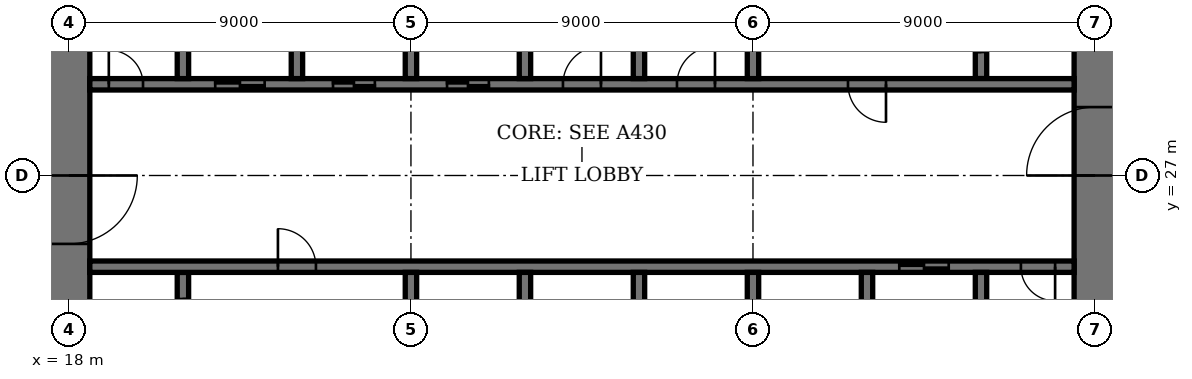
"""IFC4 building model, lengths in metres.
Left out: names, types, materials, properties, quantities, classifications, styles, units other than length and angle.
Written with IfcOpenShell. Run it as: python <this file> out.ifc"""

import sys

from ifc_helpers import new_model, si_unit, direction, frame, frame_2d, origin, place, context, subcontext, project, spatial, rectangle, extrude, element, fill, save


model = new_model("IFC4")
c1 = context("Model", 3, precision=1e-05, world=origin(), true_north=direction((0.0, 1.0)))
c2 = subcontext(c1, "Body", "Model", "MODEL_VIEW")
j1 = project(units=[si_unit("LENGTHUNIT", "METRE"), si_unit("PLANEANGLEUNIT", "RADIAN")], contexts=[c1])
p1 = place(None, origin())
s1 = spatial("IfcSite", under=j1, at=p1, CompositionType="ELEMENT")
p2 = place(p1, origin())
s2 = spatial("IfcBuilding", under=s1, at=p2, CompositionType="ELEMENT")
p3 = place(p2, frame((0.0, 0.0, 174.2)))
s3 = spatial("IfcBuildingStorey", under=s2, at=p3, CompositionType="ELEMENT", Elevation=174.2)
p4 = place(p3, frame((18.0, 35.45, 0.0), z_axis=(0.0, 0.0, 1.0), x_axis=(0.0, -1.0, 0.0)))
e1 = element("IfcWall", 1, at=p4, inside=s3, PredefinedType="SHEAR", context=c2, shape_type="SweptSolid", body=[
    extrude(rectangle(XDim=16.9, YDim=1.1, at=frame_2d((8.45, 0.0))), origin(), (0.0, 0.0, 1.0), 4.0),
])
p5 = place(p4, frame((8.45, 0.0, 0.0)))
e2 = element("IfcOpeningElement", 2, at=p5, cuts=e1, PredefinedType="OPENING", context=c2, shape_type="SweptSolid", body=[
    extrude(rectangle(XDim=1.8, YDim=2.4, at=frame_2d((0.9, 1.2))), frame((0.0, 0.56, 0.0), z_axis=(0.0, -1.0, 0.0), x_axis=(1.0, 0.0, 0.0)), (0.0, 0.0, 1.0), 1.12),
])
p6 = place(p3, frame((45.0, 18.55, 0.0), z_axis=(0.0, 0.0, 1.0), x_axis=(0.0, 1.0, 0.0)))
e3 = element("IfcWall", 3, at=p6, inside=s3, PredefinedType="SHEAR", context=c2, shape_type="SweptSolid", body=[
    extrude(rectangle(XDim=16.9, YDim=1.1, at=frame_2d((8.45, 0.0))), origin(), (0.0, 0.0, 1.0), 4.0),
])
p7 = place(p6, frame((8.45, 0.0, 0.0)))
e4 = element("IfcOpeningElement", 4, at=p7, cuts=e3, PredefinedType="OPENING", context=c2, shape_type="SweptSolid", body=[
    extrude(rectangle(XDim=1.8, YDim=2.4, at=frame_2d((0.9, 1.2))), frame((0.0, 0.56, 0.0), z_axis=(0.0, -1.0, 0.0), x_axis=(1.0, 0.0, 0.0)), (0.0, 0.0, 1.0), 1.12),
])
p8 = place(p3, frame((21.0, 21.95, 0.0), z_axis=(0.0, 0.0, 1.0), x_axis=(0.0, 1.0, 0.0)))
e5 = element("IfcWall", 5, at=p8, inside=s3, PredefinedType="SHEAR", context=c2, shape_type="SweptSolid", body=[
    extrude(rectangle(XDim=2.5, YDim=0.3, at=frame_2d((1.25, 0.0))), origin(), (0.0, 0.0, 1.0), 4.0),
])
p9 = place(p8, frame((0.7, 0.0, 0.0)))
e6 = element("IfcOpeningElement", 6, at=p9, cuts=e5, PredefinedType="OPENING", context=c2, shape_type="SweptSolid", body=[
    extrude(rectangle(XDim=1.1, YDim=2.4, at=frame_2d((0.55, 1.2))), frame((0.0, 0.16, 0.0), z_axis=(0.0, -1.0, 0.0), x_axis=(1.0, 0.0, 0.0)), (0.0, 0.0, 1.0), 0.32),
])
p10 = place(p3, frame((42.0, 29.55, 0.0), z_axis=(0.0, 0.0, 1.0), x_axis=(0.0, 1.0, 0.0)))
e7 = element("IfcWall", 7, at=p10, inside=s3, PredefinedType="SHEAR", context=c2, shape_type="SweptSolid", body=[
    extrude(rectangle(XDim=2.5, YDim=0.3, at=frame_2d((1.25, 0.0))), origin(), (0.0, 0.0, 1.0), 4.0),
])
p11 = place(p10, frame((0.7, 0.0, 0.0)))
e8 = element("IfcOpeningElement", 8, at=p11, cuts=e7, PredefinedType="OPENING", context=c2, shape_type="SweptSolid", body=[
    extrude(rectangle(XDim=1.1, YDim=2.4, at=frame_2d((0.55, 1.2))), frame((0.0, 0.16, 0.0), z_axis=(0.0, -1.0, 0.0), x_axis=(1.0, 0.0, 0.0)), (0.0, 0.0, 1.0), 0.32),
])
p12 = place(p3, frame((18.55, 24.6, 0.0), z_axis=(0.0, 0.0, 1.0), x_axis=(1.0, 0.0, 0.0)))
e9 = element("IfcWall", 9, at=p12, inside=s3, PredefinedType="SHEAR", context=c2, shape_type="SweptSolid", body=[
    extrude(rectangle(XDim=25.9, YDim=0.3, at=frame_2d((12.95, 0.0))), origin(), (0.0, 0.0, 1.0), 4.0),
])
p13 = place(p12, frame((4.95, 0.0, 0.0)))
e10 = element("IfcOpeningElement", 10, at=p13, cuts=e9, PredefinedType="OPENING", context=c2, shape_type="SweptSolid", body=[
    extrude(rectangle(XDim=1.0, YDim=2.4, at=frame_2d((0.5, 1.2))), frame((0.0, 0.16, 0.0), z_axis=(0.0, -1.0, 0.0), x_axis=(1.0, 0.0, 0.0)), (0.0, 0.0, 1.0), 0.32),
])
p14 = place(p12, frame((24.5, 0.0, 0.0)))
e11 = element("IfcOpeningElement", 11, at=p14, cuts=e9, PredefinedType="OPENING", context=c2, shape_type="SweptSolid", body=[
    extrude(rectangle(XDim=0.9, YDim=2.1, at=frame_2d((0.45, 1.05))), frame((0.0, 0.16, 0.0), z_axis=(0.0, -1.0, 0.0), x_axis=(1.0, 0.0, 0.0)), (0.0, 0.0, 1.0), 0.32),
])
p15 = place(p12, frame((21.3, 0.0, 0.0)))
e12 = element("IfcOpeningElement", 12, at=p15, cuts=e9, PredefinedType="OPENING", context=c2, shape_type="SweptSolid", body=[
    extrude(rectangle(XDim=1.3, YDim=2.4, at=frame_2d((0.65, 1.2))), frame((0.0, 0.16, 0.0), z_axis=(0.0, -1.0, 0.0), x_axis=(1.0, 0.0, 0.0)), (0.0, 0.0, 1.0), 0.32),
])
p16 = place(p3, frame((18.55, 29.4, 0.0), z_axis=(0.0, 0.0, 1.0), x_axis=(1.0, 0.0, 0.0)))
e13 = element("IfcWall", 13, at=p16, inside=s3, PredefinedType="SHEAR", context=c2, shape_type="SweptSolid", body=[
    extrude(rectangle(XDim=25.9, YDim=0.3, at=frame_2d((12.95, 0.0))), origin(), (0.0, 0.0, 1.0), 4.0),
])
p17 = place(p16, frame((19.95, 0.0, 0.0)))
e14 = element("IfcOpeningElement", 14, at=p17, cuts=e13, PredefinedType="OPENING", context=c2, shape_type="SweptSolid", body=[
    extrude(rectangle(XDim=1.0, YDim=2.4, at=frame_2d((0.5, 1.2))), frame((0.0, 0.16, 0.0), z_axis=(0.0, -1.0, 0.0), x_axis=(1.0, 0.0, 0.0)), (0.0, 0.0, 1.0), 0.32),
])
p18 = place(p16, frame((0.5, 0.0, 0.0)))
e15 = element("IfcOpeningElement", 15, at=p18, cuts=e13, PredefinedType="OPENING", context=c2, shape_type="SweptSolid", body=[
    extrude(rectangle(XDim=0.9, YDim=2.1, at=frame_2d((0.45, 1.05))), frame((0.0, 0.16, 0.0), z_axis=(0.0, -1.0, 0.0), x_axis=(1.0, 0.0, 0.0)), (0.0, 0.0, 1.0), 0.32),
])
p19 = place(p16, frame((15.45, 0.0, 0.0)))
e16 = element("IfcOpeningElement", 16, at=p19, cuts=e13, PredefinedType="OPENING", context=c2, shape_type="SweptSolid", body=[
    extrude(rectangle(XDim=1.0, YDim=2.4, at=frame_2d((0.5, 1.2))), frame((0.0, 0.16, 0.0), z_axis=(0.0, -1.0, 0.0), x_axis=(1.0, 0.0, 0.0)), (0.0, 0.0, 1.0), 0.32),
])
p20 = place(p16, frame((12.45, 0.0, 0.0)))
e17 = element("IfcOpeningElement", 17, at=p20, cuts=e13, PredefinedType="OPENING", context=c2, shape_type="SweptSolid", body=[
    extrude(rectangle(XDim=1.0, YDim=2.4, at=frame_2d((0.5, 1.2))), frame((0.0, 0.16, 0.0), z_axis=(0.0, -1.0, 0.0), x_axis=(1.0, 0.0, 0.0)), (0.0, 0.0, 1.0), 0.32),
])
p21 = place(p16, frame((9.4, 0.0, 0.0)))
e18 = element("IfcOpeningElement", 18, at=p21, cuts=e13, PredefinedType="OPENING", context=c2, shape_type="SweptSolid", body=[
    extrude(rectangle(XDim=1.1, YDim=2.4, at=frame_2d((0.55, 1.2))), frame((0.0, 0.16, 0.0), z_axis=(0.0, -1.0, 0.0), x_axis=(1.0, 0.0, 0.0)), (0.0, 0.0, 1.0), 0.32),
])
p22 = place(p16, frame((6.4, 0.0, 0.0)))
e19 = element("IfcOpeningElement", 19, at=p22, cuts=e13, PredefinedType="OPENING", context=c2, shape_type="SweptSolid", body=[
    extrude(rectangle(XDim=1.1, YDim=2.4, at=frame_2d((0.55, 1.2))), frame((0.0, 0.16, 0.0), z_axis=(0.0, -1.0, 0.0), x_axis=(1.0, 0.0, 0.0)), (0.0, 0.0, 1.0), 0.32),
])
p23 = place(p16, frame((3.3, 0.0, 0.0)))
e20 = element("IfcOpeningElement", 20, at=p23, cuts=e13, PredefinedType="OPENING", context=c2, shape_type="SweptSolid", body=[
    extrude(rectangle(XDim=1.3, YDim=2.4, at=frame_2d((0.65, 1.2))), frame((0.0, 0.16, 0.0), z_axis=(0.0, -1.0, 0.0), x_axis=(1.0, 0.0, 0.0)), (0.0, 0.0, 1.0), 0.32),
])
for number, where, z_axis, x_axis in (
    (21, (30.0, 21.75, 0.0), (0.0, 0.0, 1.0), (0.0, 1.0, 0.0)),
    (22, (33.0, 29.55, 0.0), (0.0, 0.0, 1.0), (0.0, 1.0, 0.0)),
    (23, (33.0, 21.75, 0.0), (0.0, 0.0, 1.0), (0.0, 1.0, 0.0)),
    (24, (30.0, 29.55, 0.0), (0.0, 0.0, 1.0), (0.0, 1.0, 0.0)),
    (25, (36.0, 21.75, 0.0), (0.0, 0.0, 1.0), (0.0, 1.0, 0.0)),
    (26, (27.0, 29.55, 0.0), (0.0, 0.0, 1.0), (0.0, 1.0, 0.0)),
):
    element("IfcWall", number, at=place(p3, frame(where, z_axis=z_axis, x_axis=x_axis)), inside=s3, PredefinedType="SHEAR", context=c2, shape_type="SweptSolid", body=[
        extrude(rectangle(XDim=2.7, YDim=0.3, at=frame_2d((1.35, 0.0))), origin(), (0.0, 0.0, 1.0), 4.0),
    ])
for number, where, z_axis, x_axis in (
    (27, (39.0, 18.55, 0.0), (0.0, 0.0, 1.0), (0.0, 1.0, 0.0)),
    (28, (24.0, 29.55, 0.0), (0.0, 0.0, 1.0), (0.0, 1.0, 0.0)),
):
    element("IfcWall", number, at=place(p3, frame(where, z_axis=z_axis, x_axis=x_axis)), inside=s3, PredefinedType="SHEAR", context=c2, shape_type="SweptSolid", body=[
        extrude(rectangle(XDim=5.9, YDim=0.3, at=frame_2d((2.95, 0.0))), origin(), (0.0, 0.0, 1.0), 4.0),
    ])
for number, where, z_axis, x_axis in (
    (29, (42.0, 21.75, 0.0), (0.0, 0.0, 1.0), (0.0, 1.0, 0.0)),
    (30, (21.0, 29.55, 0.0), (0.0, 0.0, 1.0), (0.0, 1.0, 0.0)),
):
    element("IfcWall", number, at=place(p3, frame(where, z_axis=z_axis, x_axis=x_axis)), inside=s3, PredefinedType="SHEAR", context=c2, shape_type="SweptSolid", body=[
        extrude(rectangle(XDim=2.7, YDim=0.3, at=frame_2d((1.35, 0.0))), origin(), (0.0, 0.0, 1.0), 4.0),
    ])
for number, where, z_axis, x_axis in (
    (31, (27.0, 21.6, 0.0), (0.0, 0.0, 1.0), (0.0, 1.0, 0.0)),
    (32, (36.0, 29.55, 0.0), (0.0, 0.0, 1.0), (0.0, 1.0, 0.0)),
):
    element("IfcWall", number, at=place(p3, frame(where, z_axis=z_axis, x_axis=x_axis)), inside=s3, PredefinedType="SHEAR", context=c2, shape_type="SweptSolid", body=[
        extrude(rectangle(XDim=2.85, YDim=0.3, at=frame_2d((1.425, 0.0))), origin(), (0.0, 0.0, 1.0), 4.0),
    ])
p24 = place(p5, origin())
e33 = element("IfcDoor", 33, at=p24, inside=s3, OperationType="DOUBLE_DOOR_DOUBLE_SWING", PredefinedType="DOOR", context=c2, shape_type="SweptSolid", body=[
    extrude(rectangle(XDim=1.8, YDim=2.4, at=frame_2d((0.9, 1.2))), frame((0.0, 0.03, 0.0), z_axis=(0.0, -1.0, 0.0), x_axis=(1.0, 0.0, 0.0)), (0.0, 0.0, 1.0), 0.06),
    extrude(rectangle(XDim=0.04, YDim=2.4, at=frame_2d((0.02, 1.2))), frame((0.0, 0.55, 0.0), z_axis=(0.0, -1.0, 0.0), x_axis=(1.0, 0.0, 0.0)), (0.0, 0.0, 1.0), 1.1),
    extrude(rectangle(XDim=0.04, YDim=2.4, at=frame_2d((1.78, 1.2))), frame((0.0, 0.55, 0.0), z_axis=(0.0, -1.0, 0.0), x_axis=(1.0, 0.0, 0.0)), (0.0, 0.0, 1.0), 1.1),
    extrude(rectangle(XDim=1.8, YDim=0.04, at=frame_2d((0.9, 2.38))), frame((0.0, 0.55, 0.0), z_axis=(0.0, -1.0, 0.0), x_axis=(1.0, 0.0, 0.0)), (0.0, 0.0, 1.0), 1.1),
])
fill(e2, e33)
p25 = place(p7, origin())
e34 = element("IfcDoor", 34, at=p25, inside=s3, OperationType="DOUBLE_DOOR_DOUBLE_SWING", PredefinedType="DOOR", context=c2, shape_type="SweptSolid", body=[
    extrude(rectangle(XDim=1.8, YDim=2.4, at=frame_2d((0.9, 1.2))), frame((0.0, 0.03, 0.0), z_axis=(0.0, -1.0, 0.0), x_axis=(1.0, 0.0, 0.0)), (0.0, 0.0, 1.0), 0.06),
    extrude(rectangle(XDim=0.04, YDim=2.4, at=frame_2d((0.02, 1.2))), frame((0.0, 0.55, 0.0), z_axis=(0.0, -1.0, 0.0), x_axis=(1.0, 0.0, 0.0)), (0.0, 0.0, 1.0), 1.1),
    extrude(rectangle(XDim=0.04, YDim=2.4, at=frame_2d((1.78, 1.2))), frame((0.0, 0.55, 0.0), z_axis=(0.0, -1.0, 0.0), x_axis=(1.0, 0.0, 0.0)), (0.0, 0.0, 1.0), 1.1),
    extrude(rectangle(XDim=1.8, YDim=0.04, at=frame_2d((0.9, 2.38))), frame((0.0, 0.55, 0.0), z_axis=(0.0, -1.0, 0.0), x_axis=(1.0, 0.0, 0.0)), (0.0, 0.0, 1.0), 1.1),
])
fill(e4, e34)
p26 = place(p13, origin())
e35 = element("IfcDoor", 35, at=p26, inside=s3, OperationType="SINGLE_SWING_RIGHT", PredefinedType="DOOR", context=c2, shape_type="SweptSolid", body=[
    extrude(rectangle(XDim=1.0, YDim=2.4, at=frame_2d((0.5, 1.2))), frame((0.0, 0.03, 0.0), z_axis=(0.0, -1.0, 0.0), x_axis=(1.0, 0.0, 0.0)), (0.0, 0.0, 1.0), 0.06),
])
fill(e10, e35)
p27 = place(p17, origin())
e36 = element("IfcDoor", 36, at=p27, inside=s3, OperationType="SINGLE_SWING_RIGHT", PredefinedType="DOOR", context=c2, shape_type="SweptSolid", body=[
    extrude(rectangle(XDim=1.0, YDim=2.4, at=frame_2d((0.5, 1.2))), frame((0.0, 0.03, 0.0), z_axis=(0.0, -1.0, 0.0), x_axis=(1.0, 0.0, 0.0)), (0.0, 0.0, 1.0), 0.06),
])
fill(e14, e36)
p28 = place(p14, origin())
e37 = element("IfcDoor", 37, at=p28, inside=s3, OperationType="SINGLE_SWING_RIGHT", PredefinedType="DOOR", context=c2, shape_type="SweptSolid", body=[
    extrude(rectangle(XDim=0.9, YDim=2.1, at=frame_2d((0.45, 1.05))), frame((0.0, 0.03, 0.0), z_axis=(0.0, -1.0, 0.0), x_axis=(1.0, 0.0, 0.0)), (0.0, 0.0, 1.0), 0.06),
])
fill(e11, e37)
p29 = place(p18, origin())
e38 = element("IfcDoor", 38, at=p29, inside=s3, OperationType="SINGLE_SWING_RIGHT", PredefinedType="DOOR", context=c2, shape_type="SweptSolid", body=[
    extrude(rectangle(XDim=0.9, YDim=2.1, at=frame_2d((0.45, 1.05))), frame((0.0, 0.03, 0.0), z_axis=(0.0, -1.0, 0.0), x_axis=(1.0, 0.0, 0.0)), (0.0, 0.0, 1.0), 0.06),
])
fill(e15, e38)
p30 = place(p19, origin())
e39 = element("IfcDoor", 39, at=p30, inside=s3, OperationType="SINGLE_SWING_LEFT", PredefinedType="DOOR", context=c2, shape_type="SweptSolid", body=[
    extrude(rectangle(XDim=1.0, YDim=2.4, at=frame_2d((0.5, 1.2))), frame((0.0, 0.03, 0.0), z_axis=(0.0, -1.0, 0.0), x_axis=(1.0, 0.0, 0.0)), (0.0, 0.0, 1.0), 0.06),
])
fill(e16, e39)
p31 = place(p20, origin())
e40 = element("IfcDoor", 40, at=p31, inside=s3, OperationType="SINGLE_SWING_LEFT", PredefinedType="DOOR", context=c2, shape_type="SweptSolid", body=[
    extrude(rectangle(XDim=1.0, YDim=2.4, at=frame_2d((0.5, 1.2))), frame((0.0, 0.03, 0.0), z_axis=(0.0, -1.0, 0.0), x_axis=(1.0, 0.0, 0.0)), (0.0, 0.0, 1.0), 0.06),
])
fill(e17, e40)
p32 = place(p21, origin())
e41 = element("IfcDoor", 41, at=p32, inside=s3, OperationType="DOUBLE_DOOR_SLIDING", PredefinedType="DOOR", context=c2, shape_type="SweptSolid", body=[
    extrude(rectangle(XDim=1.1, YDim=2.4, at=frame_2d((0.55, 1.2))), frame((0.0, 0.02, 0.0), z_axis=(0.0, -1.0, 0.0), x_axis=(1.0, 0.0, 0.0)), (0.0, 0.0, 1.0), 0.04),
])
fill(e18, e41)
p33 = place(p22, origin())
e42 = element("IfcDoor", 42, at=p33, inside=s3, OperationType="DOUBLE_DOOR_SLIDING", PredefinedType="DOOR", context=c2, shape_type="SweptSolid", body=[
    extrude(rectangle(XDim=1.1, YDim=2.4, at=frame_2d((0.55, 1.2))), frame((0.0, 0.02, 0.0), z_axis=(0.0, -1.0, 0.0), x_axis=(1.0, 0.0, 0.0)), (0.0, 0.0, 1.0), 0.04),
])
fill(e19, e42)
p34 = place(p15, origin())
e43 = element("IfcDoor", 43, at=p34, inside=s3, OperationType="DOUBLE_DOOR_SLIDING", PredefinedType="DOOR", context=c2, shape_type="SweptSolid", body=[
    extrude(rectangle(XDim=1.3, YDim=2.4, at=frame_2d((0.65, 1.2))), frame((0.0, 0.02, 0.0), z_axis=(0.0, -1.0, 0.0), x_axis=(1.0, 0.0, 0.0)), (0.0, 0.0, 1.0), 0.04),
])
fill(e12, e43)
p35 = place(p23, origin())
e44 = element("IfcDoor", 44, at=p35, inside=s3, OperationType="DOUBLE_DOOR_SLIDING", PredefinedType="DOOR", context=c2, shape_type="SweptSolid", body=[
    extrude(rectangle(XDim=1.3, YDim=2.4, at=frame_2d((0.65, 1.2))), frame((0.0, 0.02, 0.0), z_axis=(0.0, -1.0, 0.0), x_axis=(1.0, 0.0, 0.0)), (0.0, 0.0, 1.0), 0.04),
])
fill(e20, e44)
save(model, sys.argv[1])
